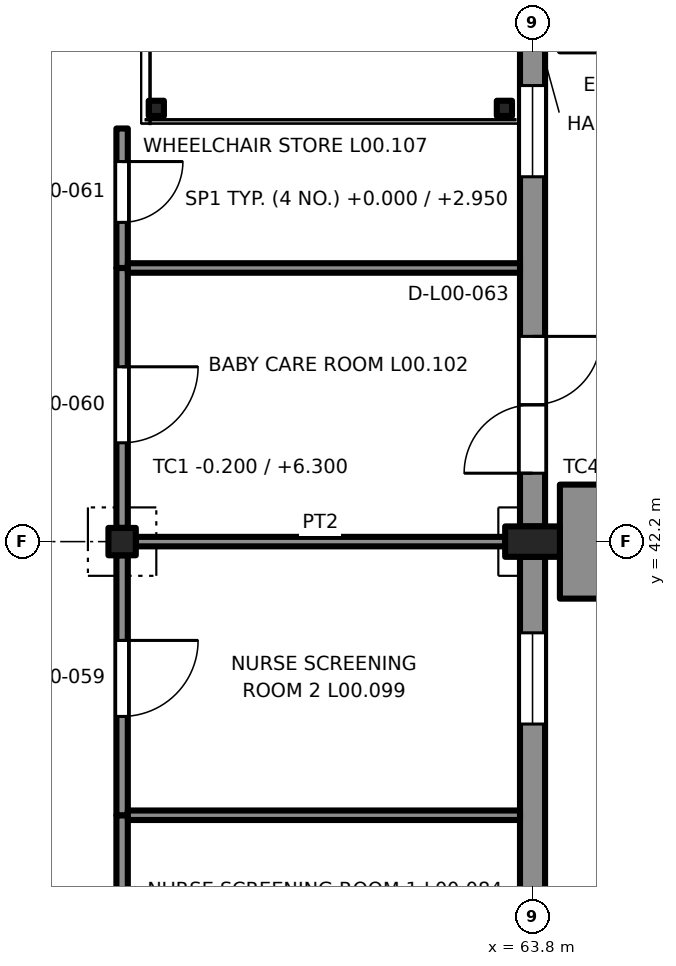
"""IFC4 building model, lengths in metres.
Left out: names, types, materials, properties, quantities, classifications, styles, units other than length and angle.
Written with IfcOpenShell. Run it as: python <this file> out.ifc"""

import sys

from ifc_helpers import new_model, si_unit, direction, frame, frame_2d, origin, origin_2d, place, context, subcontext, project, spatial, rectangle, extrude, element, fill, save


model = new_model("IFC4")
c1 = context("Model", 3, precision=1e-05, world=origin(), true_north=direction((0.0, 1.0)))
c2 = subcontext(c1, "Body", "Model", "MODEL_VIEW")
j1 = project(units=[si_unit("LENGTHUNIT", "METRE"), si_unit("PLANEANGLEUNIT", "RADIAN")], contexts=[c1])
p1 = place(None, origin())
s1 = spatial("IfcSite", under=j1, at=p1, CompositionType="ELEMENT")
p2 = place(p1, origin())
s2 = spatial("IfcBuilding", under=s1, at=p2, CompositionType="ELEMENT")
p3 = place(p2, origin())
s3 = spatial("IfcBuildingStorey", under=s2, at=p3, CompositionType="ELEMENT", Elevation=0.0)
p4 = place(p3, frame((63.8, 42.2, -0.2), z_axis=(0.0, 0.0, 1.0), x_axis=(0.0, 1.0, 0.0)))
e1 = element("IfcColumn", 1, at=p4, inside=s3, PredefinedType="COLUMN", context=c2, shape_type="SweptSolid", body=[
    extrude(rectangle(XDim=0.4, YDim=0.72, at=origin_2d()), origin(), (0.0, 0.0, 1.0), 6.5),
])
p5 = place(p3, frame((58.4, 42.2, -0.2), z_axis=(0.0, 0.0, 1.0), x_axis=(1.0, 0.0, 0.0)))
e2 = element("IfcColumn", 2, at=p5, inside=s3, PredefinedType="COLUMN", context=c2, shape_type="SweptSolid", body=[
    extrude(rectangle(XDim=0.36, YDim=0.36, at=origin_2d()), origin(), (0.0, 0.0, 1.0), 6.5),
])
for number, where, z_axis, x_axis in (
    (3, (58.85, 47.9, 0.0), (0.0, 0.0, 1.0), (1.0, 0.0, 0.0)),
    (4, (63.43, 47.9, 0.0), (0.0, 0.0, 1.0), (1.0, 0.0, 0.0)),
):
    element("IfcColumn", number, at=place(p3, frame(where, z_axis=z_axis, x_axis=x_axis)), inside=s3, PredefinedType="COLUMN", context=c2, shape_type="SweptSolid", body=[
        extrude(rectangle(XDim=0.2, YDim=0.2, at=origin_2d()), origin(), (0.0, 0.0, 1.0), 2.95),
    ])
p6 = place(p3, frame((63.8, 42.0, 0.0), z_axis=(0.0, 0.0, 1.0), x_axis=(0.0, -1.0, 0.0)))
e5 = element("IfcWall", 5, at=p6, inside=s3, PredefinedType="SOLIDWALL", context=c2, shape_type="SweptSolid", body=[
    extrude(rectangle(XDim=6.8, YDim=0.33, at=frame_2d((3.4, 0.0))), origin(), (0.0, 0.0, 1.0), 5.62),
])
p7 = place(p6, frame((4.6, 0.0, 0.9)))
e6 = element("IfcOpeningElement", 6, at=p7, cuts=e5, PredefinedType="OPENING", context=c2, shape_type="SweptSolid", body=[
    extrude(rectangle(XDim=1.2, YDim=4.2, at=frame_2d((0.6, 2.1))), frame((0.0, 0.175, 0.0), z_axis=(0.0, -1.0, 0.0), x_axis=(1.0, 0.0, 0.0)), (0.0, 0.0, 1.0), 0.35),
])
p8 = place(p6, frame((1.0, 0.0, 0.9)))
e7 = element("IfcOpeningElement", 7, at=p8, cuts=e5, PredefinedType="OPENING", context=c2, shape_type="SweptSolid", body=[
    extrude(rectangle(XDim=1.2, YDim=4.2, at=frame_2d((0.6, 2.1))), frame((0.0, 0.175, 0.0), z_axis=(0.0, -1.0, 0.0), x_axis=(1.0, 0.0, 0.0)), (0.0, 0.0, 1.0), 0.35),
])
p9 = place(p3, frame((63.8, 49.2, 0.0), z_axis=(0.0, 0.0, 1.0), x_axis=(0.0, -1.0, 0.0)))
e8 = element("IfcWall", 8, at=p9, inside=s3, PredefinedType="SOLIDWALL", context=c2, shape_type="SweptSolid", body=[
    extrude(rectangle(XDim=6.8, YDim=0.33, at=frame_2d((3.4, 0.0))), origin(), (0.0, 0.0, 1.0), 5.62),
])
p10 = place(p9, frame((4.3, 0.0, 0.0)))
e9 = element("IfcOpeningElement", 9, at=p10, cuts=e8, PredefinedType="OPENING", context=c2, shape_type="SweptSolid", body=[
    extrude(rectangle(XDim=1.8, YDim=2.4, at=frame_2d((0.9, 1.2))), frame((0.0, 0.175, 0.0), z_axis=(0.0, -1.0, 0.0), x_axis=(1.0, 0.0, 0.0)), (0.0, 0.0, 1.0), 0.35),
])
p11 = place(p9, frame((1.0, 0.0, 0.9)))
e10 = element("IfcOpeningElement", 10, at=p11, cuts=e8, PredefinedType="OPENING", context=c2, shape_type="SweptSolid", body=[
    extrude(rectangle(XDim=1.2, YDim=4.2, at=frame_2d((0.6, 2.1))), frame((0.0, 0.175, 0.0), z_axis=(0.0, -1.0, 0.0), x_axis=(1.0, 0.0, 0.0)), (0.0, 0.0, 1.0), 0.35),
])
p12 = place(p3, frame((64.71, 42.95, 0.0), z_axis=(0.0, 0.0, 1.0), x_axis=(0.0, -1.0, 0.0)))
e11 = element("IfcWall", 11, at=p12, inside=s3, PredefinedType="SOLIDWALL", context=c2, shape_type="SweptSolid", body=[
    extrude(rectangle(XDim=1.5, YDim=1.1, at=frame_2d((0.75, 0.0))), origin(), (0.0, 0.0, 1.0), 6.3),
])
p13 = place(p3, frame((58.4, 38.6, 0.0), z_axis=(0.0, 0.0, 1.0), x_axis=(0.0, -1.0, 0.0)))
e12 = element("IfcWall", 12, at=p13, inside=s3, PredefinedType="PARTITIONING", context=c2, shape_type="SweptSolid", body=[
    extrude(rectangle(XDim=3.42, YDim=0.15, at=frame_2d((1.71, 0.0))), origin(), (0.0, 0.0, 1.0), 5.62),
])
p14 = place(p13, frame((1.3, 0.0, 0.0)))
e13 = element("IfcOpeningElement", 13, at=p14, cuts=e12, PredefinedType="OPENING", context=c2, shape_type="SweptSolid", body=[
    extrude(rectangle(XDim=1.0, YDim=2.1, at=frame_2d((0.5, 1.05))), frame((0.0, 0.085, 0.0), z_axis=(0.0, -1.0, 0.0), x_axis=(1.0, 0.0, 0.0)), (0.0, 0.0, 1.0), 0.17),
])
p15 = place(p3, frame((58.4, 42.02, 0.0), z_axis=(0.0, 0.0, 1.0), x_axis=(0.0, -1.0, 0.0)))
e14 = element("IfcWall", 14, at=p15, inside=s3, PredefinedType="PARTITIONING", context=c2, shape_type="SweptSolid", body=[
    extrude(rectangle(XDim=3.42, YDim=0.15, at=frame_2d((1.71, 0.0))), origin(), (0.0, 0.0, 1.0), 5.62),
])
p16 = place(p15, frame((1.12, 0.0, 0.0)))
e15 = element("IfcOpeningElement", 15, at=p16, cuts=e14, PredefinedType="OPENING", context=c2, shape_type="SweptSolid", body=[
    extrude(rectangle(XDim=1.0, YDim=2.1, at=frame_2d((0.5, 1.05))), frame((0.0, 0.085, 0.0), z_axis=(0.0, -1.0, 0.0), x_axis=(1.0, 0.0, 0.0)), (0.0, 0.0, 1.0), 0.17),
])
p17 = place(p3, frame((63.635, 38.6, 0.0), z_axis=(0.0, 0.0, 1.0), x_axis=(-1.0, 0.0, 0.0)))
e16 = element("IfcWall", 16, at=p17, inside=s3, PredefinedType="PARTITIONING", context=c2, shape_type="SweptSolid", body=[
    extrude(rectangle(XDim=5.16, YDim=0.125, at=frame_2d((2.58, 0.0))), origin(), (0.0, 0.0, 1.0), 6.26),
])
p18 = place(p3, frame((58.4, 45.8, 0.0), z_axis=(0.0, 0.0, 1.0), x_axis=(0.0, -1.0, 0.0)))
e17 = element("IfcWall", 17, at=p18, inside=s3, PredefinedType="PARTITIONING", context=c2, shape_type="SweptSolid", body=[
    extrude(rectangle(XDim=3.42, YDim=0.15, at=frame_2d((1.71, 0.0))), origin(), (0.0, 0.0, 1.0), 5.62),
])
p19 = place(p18, frame((1.3, 0.0, 0.0)))
e18 = element("IfcOpeningElement", 18, at=p19, cuts=e17, PredefinedType="OPENING", context=c2, shape_type="SweptSolid", body=[
    extrude(rectangle(XDim=1.0, YDim=2.1, at=frame_2d((0.5, 1.05))), frame((0.0, 0.085, 0.0), z_axis=(0.0, -1.0, 0.0), x_axis=(1.0, 0.0, 0.0)), (0.0, 0.0, 1.0), 0.17),
])
p20 = place(p3, frame((63.44, 42.2, 0.0), z_axis=(0.0, 0.0, 1.0), x_axis=(-1.0, 0.0, 0.0)))
e19 = element("IfcWall", 19, at=p20, inside=s3, PredefinedType="PARTITIONING", context=c2, shape_type="SweptSolid", body=[
    extrude(rectangle(XDim=4.86, YDim=0.125, at=frame_2d((2.43, 0.0))), origin(), (0.0, 0.0, 1.0), 6.26),
])
p21 = place(p3, frame((58.4, 47.635, 0.0), z_axis=(0.0, 0.0, 1.0), x_axis=(0.0, -1.0, 0.0)))
e20 = element("IfcWall", 20, at=p21, inside=s3, PredefinedType="PARTITIONING", context=c2, shape_type="SweptSolid", body=[
    extrude(rectangle(XDim=1.835, YDim=0.15, at=frame_2d((0.917, 0.0))), origin(), (0.0, 0.0, 1.0), 5.62),
])
p22 = place(p21, frame((0.435, 0.0, 0.0)))
e21 = element("IfcOpeningElement", 21, at=p22, cuts=e20, PredefinedType="OPENING", context=c2, shape_type="SweptSolid", body=[
    extrude(rectangle(XDim=0.8, YDim=2.1, at=frame_2d((0.4, 1.05))), frame((0.0, 0.085, 0.0), z_axis=(0.0, -1.0, 0.0), x_axis=(1.0, 0.0, 0.0)), (0.0, 0.0, 1.0), 0.17),
])
p23 = place(p3, frame((63.635, 45.8, 0.0), z_axis=(0.0, 0.0, 1.0), x_axis=(-1.0, 0.0, 0.0)))
e22 = element("IfcWall", 22, at=p23, inside=s3, PredefinedType="PARTITIONING", context=c2, shape_type="SweptSolid", body=[
    extrude(rectangle(XDim=5.16, YDim=0.125, at=frame_2d((2.58, 0.0))), origin(), (0.0, 0.0, 1.0), 6.26),
])
p24 = place(p8, origin())
e23 = element("IfcWindow", 23, at=p24, inside=s3, PartitioningType="SINGLE_PANEL", PredefinedType="WINDOW", context=c2, shape_type="SweptSolid", body=[
    extrude(rectangle(XDim=1.2, YDim=4.2, at=frame_2d((0.6, 2.1))), frame((0.0, -0.03, 0.0), z_axis=(0.0, -1.0, 0.0), x_axis=(1.0, 0.0, 0.0)), (0.0, 0.0, 1.0), 0.06),
])
fill(e7, e23)
p25 = place(p10, origin())
e24 = element("IfcDoor", 24, at=p25, inside=s3, OperationType="DOUBLE_DOOR_SINGLE_SWING", PredefinedType="DOOR", context=c2, shape_type="SweptSolid", body=[
    extrude(rectangle(XDim=1.8, YDim=2.4, at=frame_2d((0.9, 1.2))), frame((0.0, 0.025, 0.0), z_axis=(0.0, -1.0, 0.0), x_axis=(1.0, 0.0, 0.0)), (0.0, 0.0, 1.0), 0.05),
])
fill(e9, e24)
p26 = place(p11, origin())
e25 = element("IfcWindow", 25, at=p26, inside=s3, PartitioningType="SINGLE_PANEL", PredefinedType="WINDOW", context=c2, shape_type="SweptSolid", body=[
    extrude(rectangle(XDim=1.2, YDim=4.2, at=frame_2d((0.6, 2.1))), frame((0.0, -0.03, 0.0), z_axis=(0.0, -1.0, 0.0), x_axis=(1.0, 0.0, 0.0)), (0.0, 0.0, 1.0), 0.06),
])
fill(e10, e25)
p27 = place(p16, origin())
e26 = element("IfcDoor", 26, at=p27, inside=s3, OperationType="SINGLE_SWING_LEFT", PredefinedType="DOOR", context=c2, shape_type="SweptSolid", body=[
    extrude(rectangle(XDim=1.0, YDim=2.1, at=frame_2d((0.5, 1.05))), frame((0.0, 0.025, 0.0), z_axis=(0.0, -1.0, 0.0), x_axis=(1.0, 0.0, 0.0)), (0.0, 0.0, 1.0), 0.05),
])
fill(e15, e26)
p28 = place(p19, origin())
e27 = element("IfcDoor", 27, at=p28, inside=s3, OperationType="SINGLE_SWING_RIGHT", PredefinedType="DOOR", context=c2, shape_type="SweptSolid", body=[
    extrude(rectangle(XDim=1.0, YDim=2.1, at=frame_2d((0.5, 1.05))), frame((0.0, 0.025, 0.0), z_axis=(0.0, -1.0, 0.0), x_axis=(1.0, 0.0, 0.0)), (0.0, 0.0, 1.0), 0.05),
])
fill(e18, e27)
p29 = place(p22, origin())
e28 = element("IfcDoor", 28, at=p29, inside=s3, OperationType="SINGLE_SWING_LEFT", PredefinedType="DOOR", context=c2, shape_type="SweptSolid", body=[
    extrude(rectangle(XDim=0.8, YDim=2.1, at=frame_2d((0.4, 1.05))), frame((0.0, 0.025, 0.0), z_axis=(0.0, -1.0, 0.0), x_axis=(1.0, 0.0, 0.0)), (0.0, 0.0, 1.0), 0.05),
])
fill(e21, e28)
save(model, sys.argv[1])
